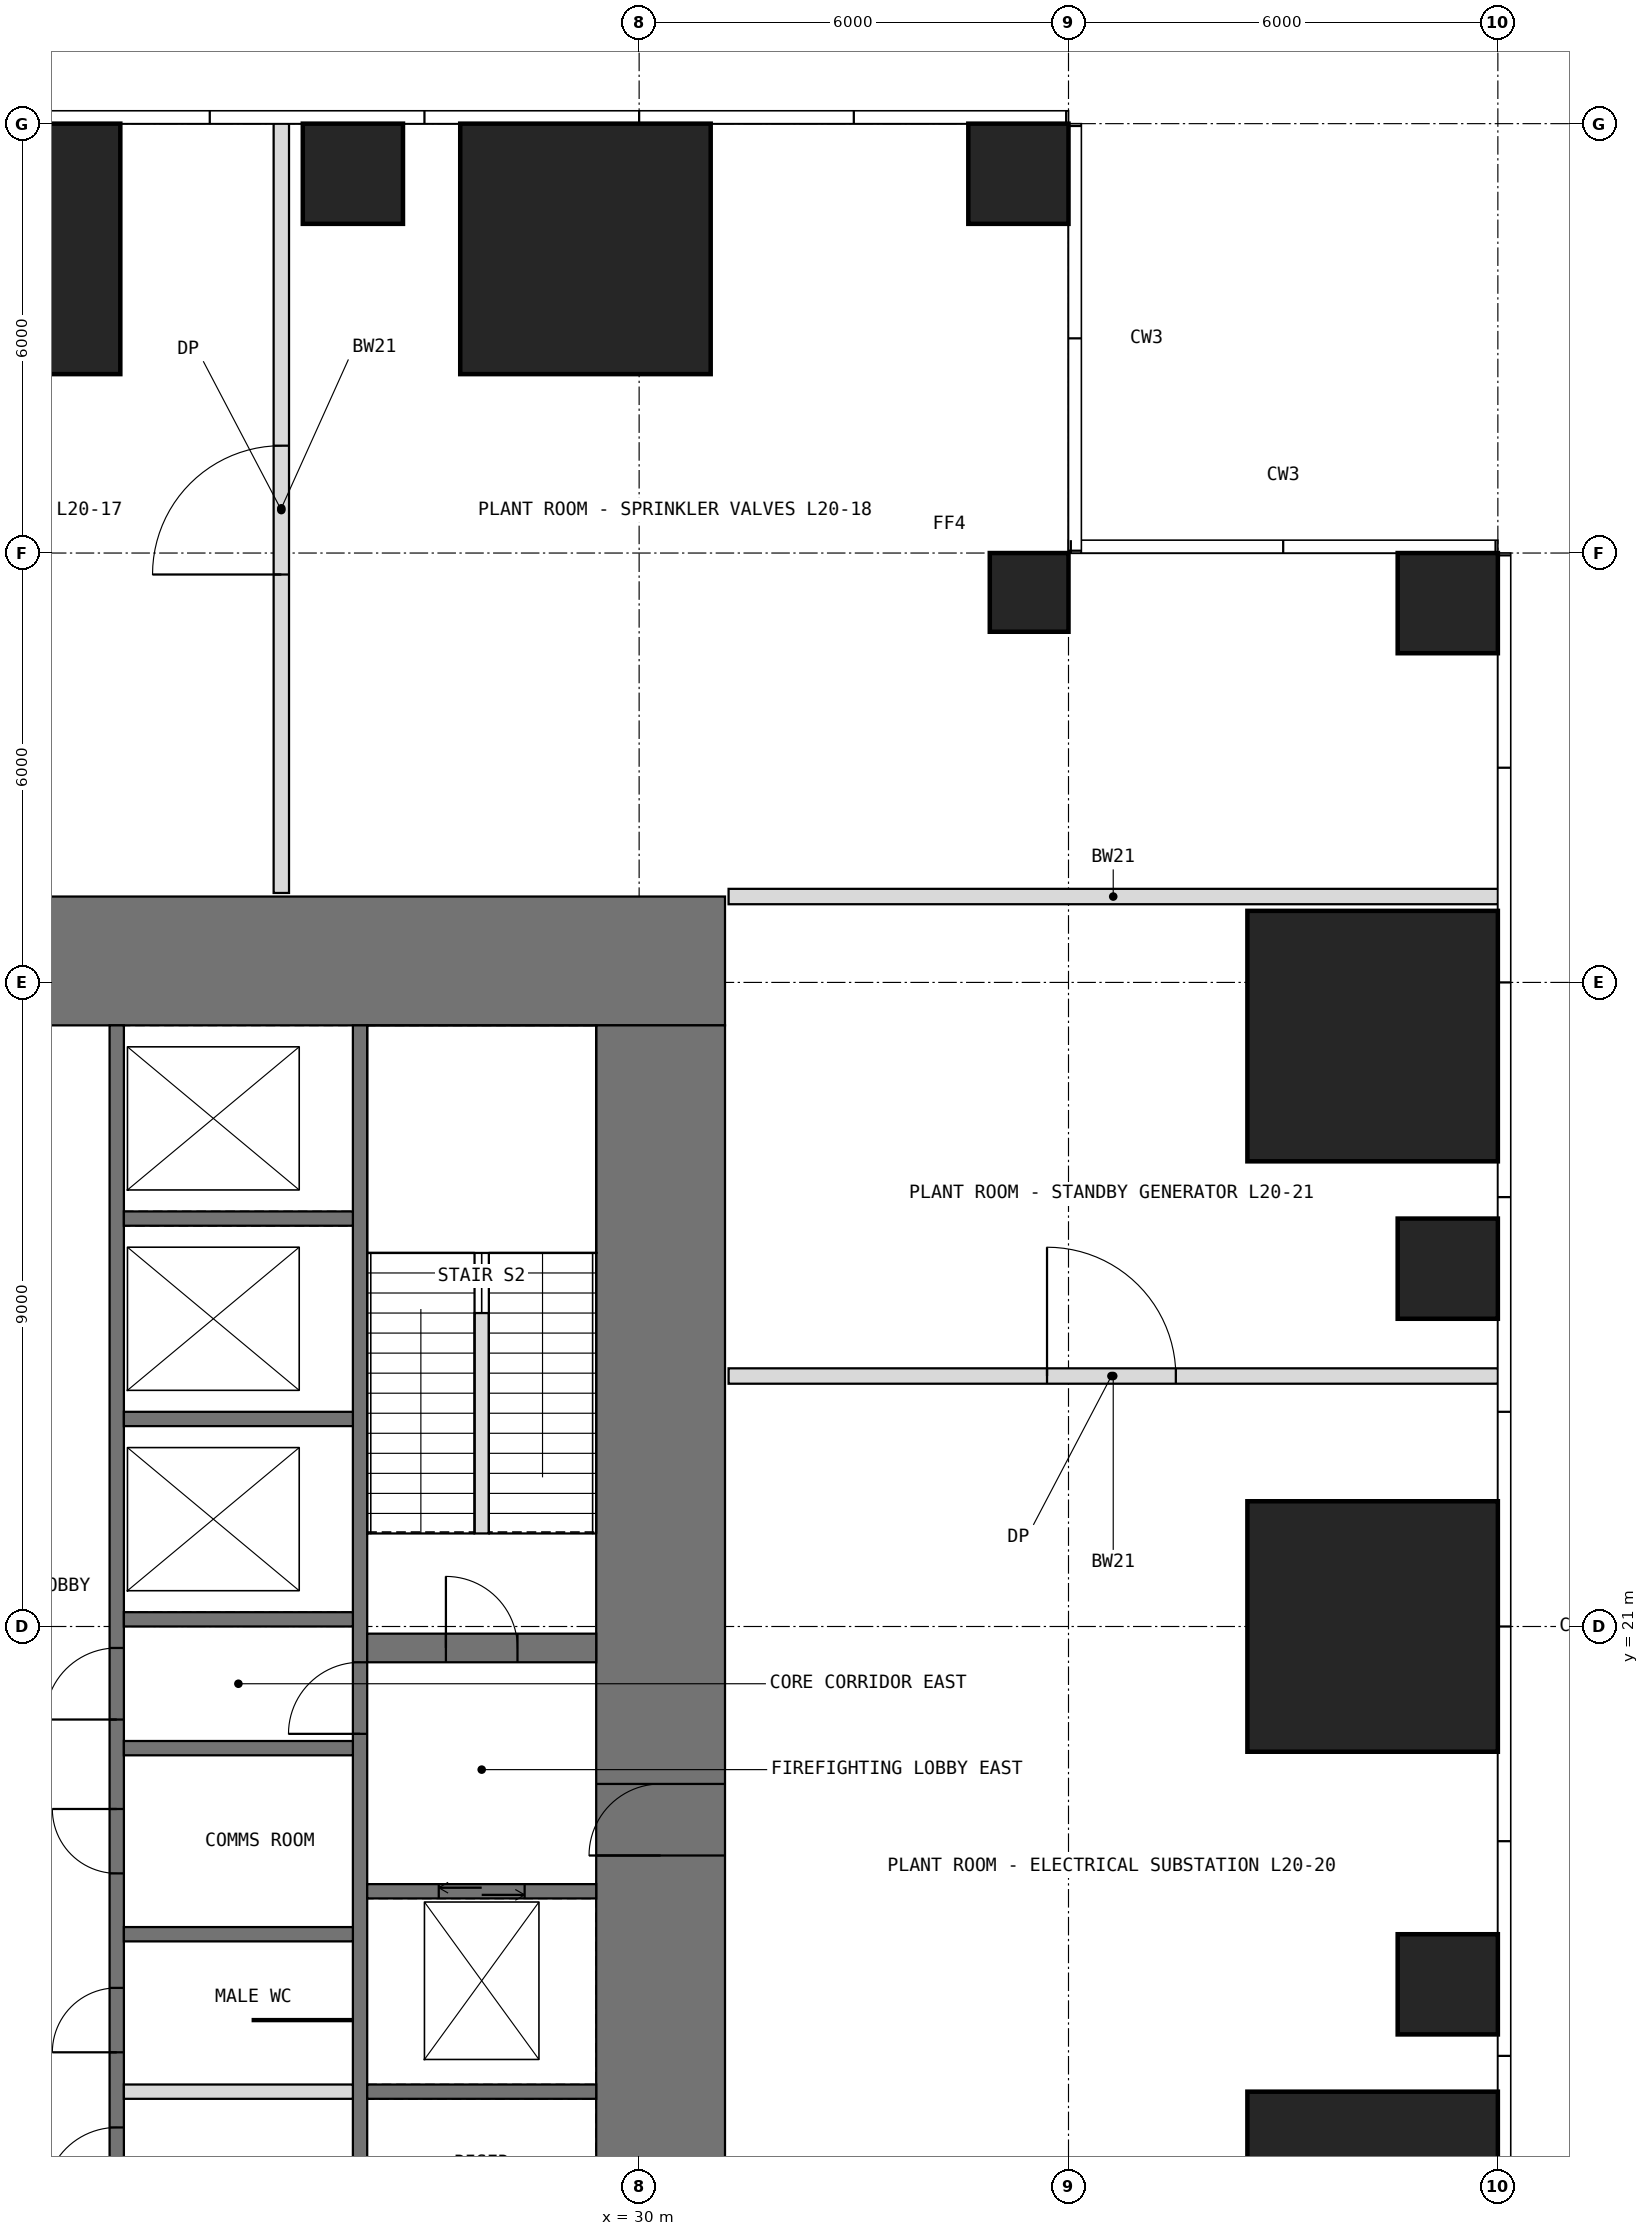
"""IFC4 building model, lengths in metres.
Left out: names, types, materials, properties, quantities, classifications, styles, units other than length and angle.
Written with IfcOpenShell. Run it as: python <this file> out.ifc"""

import sys

from ifc_helpers import new_model, si_unit, direction, frame, frame_2d, origin, origin_2d, place, context, subcontext, project, spatial, rectangle, extrude, element, fill, save


model = new_model("IFC4")
c1 = context("Model", 3, precision=1e-05, world=origin(), true_north=direction((0.0, 1.0)))
c2 = subcontext(c1, "Body", "Model", "MODEL_VIEW")
j1 = project(units=[si_unit("LENGTHUNIT", "METRE"), si_unit("PLANEANGLEUNIT", "RADIAN")], contexts=[c1])
p1 = place(None, origin())
s1 = spatial("IfcSite", under=j1, at=p1, CompositionType="ELEMENT")
p2 = place(p1, origin())
s2 = spatial("IfcBuilding", under=s1, at=p2, CompositionType="ELEMENT")
p3 = place(p2, frame((0.0, 0.0, 86.5)))
s3 = spatial("IfcBuildingStorey", under=s2, at=p3, CompositionType="ELEMENT", Elevation=86.5)
p4 = place(p3, frame((40.25, 12.75, 0.0), z_axis=(0.0, 0.0, 1.0), x_axis=(1.0, 0.0, 0.0)))
e1 = element("IfcColumn", 1, at=p4, inside=s3, PredefinedType="COLUMN", context=c2, shape_type="SweptSolid", body=[
    extrude(rectangle(XDim=3.5, YDim=3.5, at=origin_2d()), origin(), (0.0, 0.0, 1.0), 5.0),
])
p5 = place(p3, frame((41.3, 16.0, 0.0), z_axis=(0.0, 0.0, 1.0), x_axis=(1.0, 0.0, 0.0)))
e2 = element("IfcColumn", 2, at=p5, inside=s3, PredefinedType="COLUMN", context=c2, shape_type="SweptSolid", body=[
    extrude(rectangle(XDim=1.4, YDim=1.4, at=origin_2d()), origin(), (0.0, 0.0, 1.0), 5.0),
])
p6 = place(p3, frame((40.25, 21.0, 0.0), z_axis=(0.0, 0.0, 1.0), x_axis=(1.0, 0.0, 0.0)))
e3 = element("IfcColumn", 3, at=p6, inside=s3, PredefinedType="COLUMN", context=c2, shape_type="SweptSolid", body=[
    extrude(rectangle(XDim=3.5, YDim=3.5, at=origin_2d()), origin(), (0.0, 0.0, 1.0), 5.0),
])
p7 = place(p3, frame((41.3, 26.0, 0.0), z_axis=(0.0, 0.0, 1.0), x_axis=(1.0, 0.0, 0.0)))
e4 = element("IfcColumn", 4, at=p7, inside=s3, PredefinedType="COLUMN", context=c2, shape_type="SweptSolid", body=[
    extrude(rectangle(XDim=1.4, YDim=1.4, at=origin_2d()), origin(), (0.0, 0.0, 1.0), 5.0),
])
p8 = place(p3, frame((40.25, 29.25, 0.0), z_axis=(0.0, 0.0, 1.0), x_axis=(1.0, 0.0, 0.0)))
e5 = element("IfcColumn", 5, at=p8, inside=s3, PredefinedType="COLUMN", context=c2, shape_type="SweptSolid", body=[
    extrude(rectangle(XDim=3.5, YDim=3.5, at=origin_2d()), origin(), (0.0, 0.0, 1.0), 5.0),
])
p9 = place(p3, frame((35.45, 35.45, 0.0), z_axis=(0.0, 0.0, 1.0), x_axis=(1.0, 0.0, 0.0)))
e6 = element("IfcColumn", 6, at=p9, inside=s3, PredefinedType="COLUMN", context=c2, shape_type="SweptSolid", body=[
    extrude(rectangle(XDim=1.1, YDim=1.1, at=origin_2d()), origin(), (0.0, 0.0, 1.0), 5.0),
])
p10 = place(p3, frame((41.3, 35.3, 0.0), z_axis=(0.0, 0.0, 1.0), x_axis=(1.0, 0.0, 0.0)))
e7 = element("IfcColumn", 7, at=p10, inside=s3, PredefinedType="COLUMN", context=c2, shape_type="SweptSolid", body=[
    extrude(rectangle(XDim=1.4, YDim=1.4, at=origin_2d()), origin(), (0.0, 0.0, 1.0), 5.0),
])
p11 = place(p3, frame((21.0, 40.25, 0.0), z_axis=(0.0, 0.0, 1.0), x_axis=(1.0, 0.0, 0.0)))
e8 = element("IfcColumn", 8, at=p11, inside=s3, PredefinedType="COLUMN", context=c2, shape_type="SweptSolid", body=[
    extrude(rectangle(XDim=3.5, YDim=3.5, at=origin_2d()), origin(), (0.0, 0.0, 1.0), 5.0),
])
p12 = place(p3, frame((26.0, 41.3, 0.0), z_axis=(0.0, 0.0, 1.0), x_axis=(1.0, 0.0, 0.0)))
e9 = element("IfcColumn", 9, at=p12, inside=s3, PredefinedType="COLUMN", context=c2, shape_type="SweptSolid", body=[
    extrude(rectangle(XDim=1.4, YDim=1.4, at=origin_2d()), origin(), (0.0, 0.0, 1.0), 5.0),
])
p13 = place(p3, frame((29.25, 40.25, 0.0), z_axis=(0.0, 0.0, 1.0), x_axis=(1.0, 0.0, 0.0)))
e10 = element("IfcColumn", 10, at=p13, inside=s3, PredefinedType="COLUMN", context=c2, shape_type="SweptSolid", body=[
    extrude(rectangle(XDim=3.5, YDim=3.5, at=origin_2d()), origin(), (0.0, 0.0, 1.0), 5.0),
])
p14 = place(p3, frame((35.3, 41.3, 0.0), z_axis=(0.0, 0.0, 1.0), x_axis=(1.0, 0.0, 0.0)))
e11 = element("IfcColumn", 11, at=p14, inside=s3, PredefinedType="COLUMN", context=c2, shape_type="SweptSolid", body=[
    extrude(rectangle(XDim=1.4, YDim=1.4, at=origin_2d()), origin(), (0.0, 0.0, 1.0), 5.0),
])
p15 = place(p3, frame((10.8, 30.3, -0.25), z_axis=(0.0, 0.0, 1.0), x_axis=(1.0, 0.0, 0.0)))
e12 = element("IfcWall", 12, at=p15, inside=s3, PredefinedType="SHEAR", context=c2, shape_type="SweptSolid", body=[
    extrude(rectangle(XDim=20.4, YDim=1.8, at=frame_2d((10.2, 0.0))), origin(), (0.0, 0.0, 1.0), 5.2),
])
p16 = place(p15, frame((6.325, 0.0, 0.25)))
e13 = element("IfcOpeningElement", 13, at=p16, cuts=e12, PredefinedType="OPENING", context=c2, shape_type="SweptSolid", body=[
    extrude(rectangle(XDim=0.95, YDim=2.4, at=frame_2d((0.475, 1.2))), frame((0.0, 0.91, 0.0), z_axis=(0.0, -1.0, 0.0), x_axis=(1.0, 0.0, 0.0)), (0.0, 0.0, 1.0), 1.82),
])
p17 = place(p3, frame((30.3, 12.6, -0.25), z_axis=(0.0, 0.0, 1.0), x_axis=(0.0, 1.0, 0.0)))
e14 = element("IfcWall", 14, at=p17, inside=s3, PredefinedType="SHEAR", context=c2, shape_type="SweptSolid", body=[
    extrude(rectangle(XDim=16.8, YDim=1.8, at=frame_2d((8.4, 0.0))), origin(), (0.0, 0.0, 1.0), 5.2),
])
p18 = place(p17, frame((5.2, 0.0, 0.25)))
e15 = element("IfcOpeningElement", 15, at=p18, cuts=e14, PredefinedType="OPENING", context=c2, shape_type="SweptSolid", body=[
    extrude(rectangle(XDim=1.0, YDim=2.2, at=frame_2d((0.5, 1.1))), frame((0.0, 0.91, 0.0), z_axis=(0.0, -1.0, 0.0), x_axis=(1.0, 0.0, 0.0)), (0.0, 0.0, 1.0), 1.82),
])
p19 = place(p3, frame((22.7, 12.6, -0.25), z_axis=(0.0, 0.0, 1.0), x_axis=(0.0, 1.0, 0.0)))
e16 = element("IfcWall", 16, at=p19, inside=s3, PredefinedType="SHEAR", context=c2, shape_type="SweptSolid", body=[
    extrude(rectangle(XDim=16.8, YDim=0.2, at=frame_2d((8.4, 0.0))), origin(), (0.0, 0.0, 1.0), 5.2),
])
p20 = place(p19, frame((0.4, 0.0, 0.25)))
e17 = element("IfcOpeningElement", 17, at=p20, cuts=e16, PredefinedType="OPENING", context=c2, shape_type="SweptSolid", body=[
    extrude(rectangle(XDim=1.0, YDim=2.2, at=frame_2d((0.5, 1.1))), frame((0.0, 0.11, 0.0), z_axis=(0.0, -1.0, 0.0), x_axis=(1.0, 0.0, 0.0)), (0.0, 0.0, 1.0), 0.22),
])
p21 = place(p19, frame((7.1, 0.0, 0.25)))
e18 = element("IfcOpeningElement", 18, at=p21, cuts=e16, PredefinedType="OPENING", context=c2, shape_type="SweptSolid", body=[
    extrude(rectangle(XDim=1.0, YDim=2.2, at=frame_2d((0.5, 1.1))), frame((0.0, 0.11, 0.0), z_axis=(0.0, -1.0, 0.0), x_axis=(1.0, 0.0, 0.0)), (0.0, 0.0, 1.0), 0.22),
])
p22 = place(p19, frame((2.45, 0.0, 0.25)))
e19 = element("IfcOpeningElement", 19, at=p22, cuts=e16, PredefinedType="OPENING", context=c2, shape_type="SweptSolid", body=[
    extrude(rectangle(XDim=0.9, YDim=2.2, at=frame_2d((0.45, 1.1))), frame((0.0, 0.11, 0.0), z_axis=(0.0, -1.0, 0.0), x_axis=(1.0, 0.0, 0.0)), (0.0, 0.0, 1.0), 0.22),
])
p23 = place(p19, frame((4.95, 0.0, 0.25)))
e20 = element("IfcOpeningElement", 20, at=p23, cuts=e16, PredefinedType="OPENING", context=c2, shape_type="SweptSolid", body=[
    extrude(rectangle(XDim=0.9, YDim=2.2, at=frame_2d((0.45, 1.1))), frame((0.0, 0.11, 0.0), z_axis=(0.0, -1.0, 0.0), x_axis=(1.0, 0.0, 0.0)), (0.0, 0.0, 1.0), 0.22),
])
p24 = place(p3, frame((26.1, 12.6, -0.25), z_axis=(0.0, 0.0, 1.0), x_axis=(0.0, 1.0, 0.0)))
e21 = element("IfcWall", 21, at=p24, inside=s3, PredefinedType="SHEAR", context=c2, shape_type="SweptSolid", body=[
    extrude(rectangle(XDim=16.8, YDim=0.2, at=frame_2d((8.4, 0.0))), origin(), (0.0, 0.0, 1.0), 5.2),
])
p25 = place(p24, frame((6.9, 0.0, 0.25)))
e22 = element("IfcOpeningElement", 22, at=p25, cuts=e21, PredefinedType="OPENING", context=c2, shape_type="SweptSolid", body=[
    extrude(rectangle(XDim=1.0, YDim=2.2, at=frame_2d((0.5, 1.1))), frame((0.0, 0.11, 0.0), z_axis=(0.0, -1.0, 0.0), x_axis=(1.0, 0.0, 0.0)), (0.0, 0.0, 1.0), 0.22),
])
for number, where, z_axis, x_axis in (
    (23, (22.8, 16.7, -0.25), (0.0, 0.0, 1.0), (1.0, 0.0, 0.0)),
    (24, (22.8, 19.3, -0.25), (0.0, 0.0, 1.0), (1.0, 0.0, 0.0)),
    (25, (22.8, 21.1, -0.25), (0.0, 0.0, 1.0), (1.0, 0.0, 0.0)),
    (26, (22.8, 23.9, -0.25), (0.0, 0.0, 1.0), (1.0, 0.0, 0.0)),
    (27, (22.8, 26.7, -0.25), (0.0, 0.0, 1.0), (1.0, 0.0, 0.0)),
    (28, (26.2, 14.5, -0.25), (0.0, 0.0, 1.0), (1.0, 0.0, 0.0)),
):
    element("IfcWall", number, at=place(p3, frame(where, z_axis=z_axis, x_axis=x_axis)), inside=s3, PredefinedType="SHEAR", context=c2, shape_type="SweptSolid", body=[
        extrude(rectangle(XDim=3.2, YDim=0.2, at=frame_2d((1.6, 0.0))), origin(), (0.0, 0.0, 1.0), 5.2),
    ])
p26 = place(p3, frame((26.2, 17.3, -0.25), z_axis=(0.0, 0.0, 1.0), x_axis=(1.0, 0.0, 0.0)))
e29 = element("IfcWall", 29, at=p26, inside=s3, PredefinedType="SHEAR", context=c2, shape_type="SweptSolid", body=[
    extrude(rectangle(XDim=3.2, YDim=0.2, at=frame_2d((1.6, 0.0))), origin(), (0.0, 0.0, 1.0), 5.2),
])
p27 = place(p26, frame((1.0, 0.0, 0.25)))
e30 = element("IfcOpeningElement", 30, at=p27, cuts=e29, PredefinedType="OPENING", context=c2, shape_type="SweptSolid", body=[
    extrude(rectangle(XDim=1.2, YDim=2.2, at=frame_2d((0.6, 1.1))), frame((0.0, 0.11, 0.0), z_axis=(0.0, -1.0, 0.0), x_axis=(1.0, 0.0, 0.0)), (0.0, 0.0, 1.0), 0.22),
])
p28 = place(p3, frame((26.2, 20.7, -0.25), z_axis=(0.0, 0.0, 1.0), x_axis=(1.0, 0.0, 0.0)))
e31 = element("IfcWall", 31, at=p28, inside=s3, PredefinedType="SHEAR", context=c2, shape_type="SweptSolid", body=[
    extrude(rectangle(XDim=3.2, YDim=0.4, at=frame_2d((1.6, 0.0))), origin(), (0.0, 0.0, 1.0), 5.2),
])
p29 = place(p28, frame((1.1, 0.0, 0.25)))
e32 = element("IfcOpeningElement", 32, at=p29, cuts=e31, PredefinedType="OPENING", context=c2, shape_type="SweptSolid", body=[
    extrude(rectangle(XDim=1.0, YDim=2.2, at=frame_2d((0.5, 1.1))), frame((0.0, 0.21, 0.0), z_axis=(0.0, -1.0, 0.0), x_axis=(1.0, 0.0, 0.0)), (0.0, 0.0, 1.0), 0.42),
])
p30 = place(p3, frame((22.8, 14.5, 0.0), z_axis=(0.0, 0.0, 1.0), x_axis=(1.0, 0.0, 0.0)))
e33 = element("IfcWall", 33, at=p30, inside=s3, PredefinedType="PARTITIONING", context=c2, shape_type="SweptSolid", body=[
    extrude(rectangle(XDim=3.2, YDim=0.2, at=frame_2d((1.6, 0.0))), origin(), (0.0, 0.0, 1.0), 4.75),
])
p31 = place(p3, frame((24.6, 15.5, 0.0), z_axis=(0.0, 0.0, 1.0), x_axis=(1.0, 0.0, 0.0)))
e34 = element("IfcWall", 34, at=p31, inside=s3, PredefinedType="PARTITIONING", context=c2, shape_type="SweptSolid", body=[
    extrude(rectangle(XDim=1.4, YDim=0.03, at=frame_2d((0.7, 0.0))), origin(), (0.0, 0.0, 1.0), 4.75),
])
p32 = place(p3, frame((25.0, 31.25, 0.0), z_axis=(0.0, 0.0, 1.0), x_axis=(0.0, 1.0, 0.0)))
e35 = element("IfcWall", 35, at=p32, inside=s3, PredefinedType="PARTITIONING", context=c2, shape_type="SweptSolid", body=[
    extrude(rectangle(XDim=10.75, YDim=0.215, at=frame_2d((5.375, 0.0))), origin(), (0.0, 0.0, 1.0), 4.75),
])
p33 = place(p32, frame((4.45, 0.0, 0.0)))
e36 = element("IfcOpeningElement", 36, at=p33, cuts=e35, PredefinedType="OPENING", context=c2, shape_type="SweptSolid", body=[
    extrude(rectangle(XDim=1.8, YDim=2.4, at=frame_2d((0.9, 1.2))), frame((0.0, 0.118, 0.0), z_axis=(0.0, -1.0, 0.0), x_axis=(1.0, 0.0, 0.0)), (0.0, 0.0, 1.0), 0.235),
])
p34 = place(p3, frame((31.25, 24.5, 0.0), z_axis=(0.0, 0.0, 1.0), x_axis=(1.0, 0.0, 0.0)))
e37 = element("IfcWall", 37, at=p34, inside=s3, PredefinedType="PARTITIONING", context=c2, shape_type="SweptSolid", body=[
    extrude(rectangle(XDim=10.75, YDim=0.215, at=frame_2d((5.375, 0.0))), origin(), (0.0, 0.0, 1.0), 4.75),
])
p35 = place(p34, frame((4.45, 0.0, 0.0)))
e38 = element("IfcOpeningElement", 38, at=p35, cuts=e37, PredefinedType="OPENING", context=c2, shape_type="SweptSolid", body=[
    extrude(rectangle(XDim=1.8, YDim=2.4, at=frame_2d((0.9, 1.2))), frame((0.0, 0.118, 0.0), z_axis=(0.0, -1.0, 0.0), x_axis=(1.0, 0.0, 0.0)), (0.0, 0.0, 1.0), 0.235),
])
p36 = place(p3, frame((31.25, 31.2, 0.0), z_axis=(0.0, 0.0, 1.0), x_axis=(1.0, 0.0, 0.0)))
e39 = element("IfcWall", 39, at=p36, inside=s3, PredefinedType="PARTITIONING", context=c2, shape_type="SweptSolid", body=[
    extrude(rectangle(XDim=10.75, YDim=0.215, at=frame_2d((5.375, 0.0))), origin(), (0.0, 0.0, 1.0), 4.75),
])
p37 = place(p3, frame((27.8, 22.3, 0.0), z_axis=(0.0, 0.0, 1.0), x_axis=(0.0, 1.0, 0.0)))
e40 = element("IfcWall", 40, at=p37, inside=s3, PredefinedType="PARTITIONING", context=c2, shape_type="SweptSolid", body=[
    extrude(rectangle(XDim=3.08, YDim=0.2, at=frame_2d((1.54, 0.0))), origin(), (0.0, 0.0, 1.0), 5.0),
])
p38 = place(p20, origin())
e41 = element("IfcDoor", 41, at=p38, inside=s3, OperationType="SINGLE_SWING_LEFT", PredefinedType="DOOR", context=c2, shape_type="SweptSolid", body=[
    extrude(rectangle(XDim=1.0, YDim=2.2, at=frame_2d((0.5, 1.1))), frame((0.0, 0.025, 0.0), z_axis=(0.0, -1.0, 0.0), x_axis=(1.0, 0.0, 0.0)), (0.0, 0.0, 1.0), 0.05),
])
fill(e17, e41)
p39 = place(p18, origin())
e42 = element("IfcDoor", 42, at=p39, inside=s3, OperationType="SINGLE_SWING_LEFT", PredefinedType="DOOR", context=c2, shape_type="SweptSolid", body=[
    extrude(rectangle(XDim=1.0, YDim=2.2, at=frame_2d((0.5, 1.1))), frame((0.0, 0.025, 0.0), z_axis=(0.0, -1.0, 0.0), x_axis=(1.0, 0.0, 0.0)), (0.0, 0.0, 1.0), 0.05),
])
fill(e15, e42)
p40 = place(p29, origin())
e43 = element("IfcDoor", 43, at=p40, inside=s3, OperationType="SINGLE_SWING_LEFT", PredefinedType="DOOR", context=c2, shape_type="SweptSolid", body=[
    extrude(rectangle(XDim=1.0, YDim=2.2, at=frame_2d((0.5, 1.1))), frame((0.0, 0.025, 0.0), z_axis=(0.0, -1.0, 0.0), x_axis=(1.0, 0.0, 0.0)), (0.0, 0.0, 1.0), 0.05),
])
fill(e32, e43)
p41 = place(p25, origin())
e44 = element("IfcDoor", 44, at=p41, inside=s3, OperationType="SINGLE_SWING_LEFT", PredefinedType="DOOR", context=c2, shape_type="SweptSolid", body=[
    extrude(rectangle(XDim=1.0, YDim=2.2, at=frame_2d((0.5, 1.1))), frame((0.0, 0.025, 0.0), z_axis=(0.0, -1.0, 0.0), x_axis=(1.0, 0.0, 0.0)), (0.0, 0.0, 1.0), 0.05),
])
fill(e22, e44)
p42 = place(p21, origin())
e45 = element("IfcDoor", 45, at=p42, inside=s3, OperationType="SINGLE_SWING_LEFT", PredefinedType="DOOR", context=c2, shape_type="SweptSolid", body=[
    extrude(rectangle(XDim=1.0, YDim=2.2, at=frame_2d((0.5, 1.1))), frame((0.0, 0.025, 0.0), z_axis=(0.0, -1.0, 0.0), x_axis=(1.0, 0.0, 0.0)), (0.0, 0.0, 1.0), 0.05),
])
fill(e18, e45)
p43 = place(p22, origin())
e46 = element("IfcDoor", 46, at=p43, inside=s3, OperationType="SINGLE_SWING_LEFT", PredefinedType="DOOR", context=c2, shape_type="SweptSolid", body=[
    extrude(rectangle(XDim=0.9, YDim=2.2, at=frame_2d((0.45, 1.1))), frame((0.0, 0.025, 0.0), z_axis=(0.0, -1.0, 0.0), x_axis=(1.0, 0.0, 0.0)), (0.0, 0.0, 1.0), 0.05),
])
fill(e19, e46)
p44 = place(p23, origin())
e47 = element("IfcDoor", 47, at=p44, inside=s3, OperationType="SINGLE_SWING_RIGHT", PredefinedType="DOOR", context=c2, shape_type="SweptSolid", body=[
    extrude(rectangle(XDim=0.9, YDim=2.2, at=frame_2d((0.45, 1.1))), frame((0.0, 0.025, 0.0), z_axis=(0.0, -1.0, 0.0), x_axis=(1.0, 0.0, 0.0)), (0.0, 0.0, 1.0), 0.05),
])
fill(e20, e47)
p45 = place(p33, origin())
e48 = element("IfcDoor", 48, at=p45, inside=s3, OperationType="DOUBLE_DOOR_SINGLE_SWING", PredefinedType="DOOR", context=c2, shape_type="SweptSolid", body=[
    extrude(rectangle(XDim=1.8, YDim=2.4, at=frame_2d((0.9, 1.2))), frame((0.0, 0.025, 0.0), z_axis=(0.0, -1.0, 0.0), x_axis=(1.0, 0.0, 0.0)), (0.0, 0.0, 1.0), 0.05),
])
fill(e36, e48)
p46 = place(p35, origin())
e49 = element("IfcDoor", 49, at=p46, inside=s3, OperationType="DOUBLE_DOOR_SINGLE_SWING", PredefinedType="DOOR", context=c2, shape_type="SweptSolid", body=[
    extrude(rectangle(XDim=1.8, YDim=2.4, at=frame_2d((0.9, 1.2))), frame((0.0, 0.025, 0.0), z_axis=(0.0, -1.0, 0.0), x_axis=(1.0, 0.0, 0.0)), (0.0, 0.0, 1.0), 0.05),
])
fill(e38, e49)
p47 = place(p27, origin())
e50 = element("IfcDoor", 50, at=p47, inside=s3, OperationType="DOUBLE_DOOR_SLIDING", PredefinedType="DOOR", context=c2, shape_type="SweptSolid", body=[
    extrude(rectangle(XDim=1.2, YDim=2.2, at=frame_2d((0.6, 1.1))), frame((0.0, 0.025, 0.0), z_axis=(0.0, -1.0, 0.0), x_axis=(1.0, 0.0, 0.0)), (0.0, 0.0, 1.0), 0.05),
])
fill(e30, e50)
save(model, sys.argv[1])
